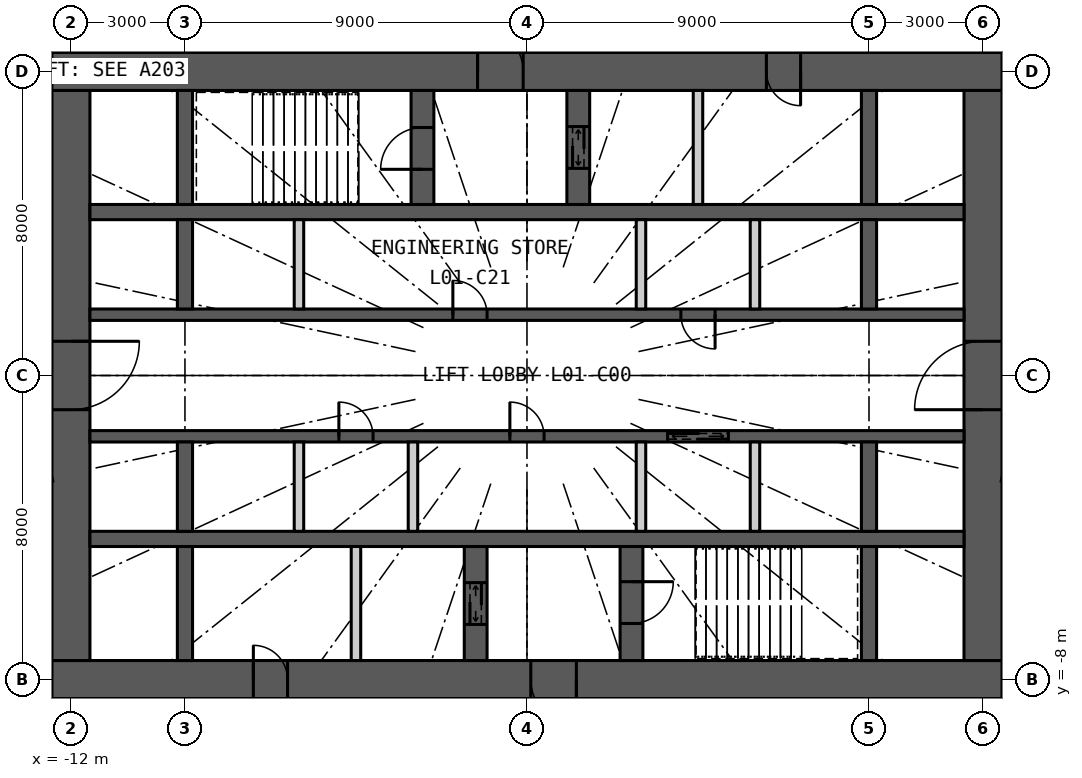
"""IFC4 building model, lengths in metres.
Left out: names, types, materials, properties, quantities, classifications, styles, units other than length and angle.
Written with IfcOpenShell. Run it as: python <this file> out.ifc"""

import sys

from ifc_helpers import new_model, si_unit, direction, frame, frame_2d, origin, place, context, subcontext, project, spatial, rectangle, extrude, element, fill, save


model = new_model("IFC4")
c1 = context("Model", 3, precision=1e-05, world=origin(), true_north=direction((0.0, 1.0)))
c2 = subcontext(c1, "Body", "Model", "MODEL_VIEW")
j1 = project(units=[si_unit("LENGTHUNIT", "METRE"), si_unit("PLANEANGLEUNIT", "RADIAN")], contexts=[c1])
p1 = place(None, origin())
s1 = spatial("IfcSite", under=j1, at=p1, CompositionType="ELEMENT")
p2 = place(p1, origin())
s2 = spatial("IfcBuilding", under=s1, at=p2, CompositionType="ELEMENT")
p3 = place(p2, frame((0.0, 0.0, 7.2)))
s3 = spatial("IfcBuildingStorey", under=s2, at=p3, CompositionType="ELEMENT", Elevation=7.2)
p4 = place(p3, frame((-12.5, 8.0, 0.0), z_axis=(0.0, 0.0, 1.0), x_axis=(1.0, 0.0, 0.0)))
e1 = element("IfcWall", 1, at=p4, inside=s3, PredefinedType="SHEAR", context=c2, shape_type="SweptSolid", body=[
    extrude(rectangle(XDim=25.0, YDim=1.0, at=frame_2d((12.5, 0.0))), origin(), (0.0, 0.0, 1.0), 6.6),
])
p5 = place(p4, frame((11.2, 0.0, 0.0)))
e2 = element("IfcOpeningElement", 2, at=p5, cuts=e1, PredefinedType="OPENING", context=c2, shape_type="SweptSolid", body=[
    extrude(rectangle(XDim=1.2, YDim=2.2, at=frame_2d((0.6, 1.1))), frame((0.0, 0.51, 0.0), z_axis=(0.0, -1.0, 0.0), x_axis=(1.0, 0.0, 0.0)), (0.0, 0.0, 1.0), 1.02),
])
p6 = place(p4, frame((18.8, 0.0, 0.0)))
e3 = element("IfcOpeningElement", 3, at=p6, cuts=e1, PredefinedType="OPENING", context=c2, shape_type="SweptSolid", body=[
    extrude(rectangle(XDim=0.9, YDim=2.2, at=frame_2d((0.45, 1.1))), frame((0.0, 0.51, 0.0), z_axis=(0.0, -1.0, 0.0), x_axis=(1.0, 0.0, 0.0)), (0.0, 0.0, 1.0), 1.02),
])
p7 = place(p3, frame((12.5, -8.0, 0.0), z_axis=(0.0, 0.0, 1.0), x_axis=(-1.0, 0.0, 0.0)))
e4 = element("IfcWall", 4, at=p7, inside=s3, PredefinedType="SHEAR", context=c2, shape_type="SweptSolid", body=[
    extrude(rectangle(XDim=25.0, YDim=1.0, at=frame_2d((12.5, 0.0))), origin(), (0.0, 0.0, 1.0), 6.6),
])
p8 = place(p7, frame((11.2, 0.0, 0.0)))
e5 = element("IfcOpeningElement", 5, at=p8, cuts=e4, PredefinedType="OPENING", context=c2, shape_type="SweptSolid", body=[
    extrude(rectangle(XDim=1.2, YDim=2.2, at=frame_2d((0.6, 1.1))), frame((0.0, 0.51, 0.0), z_axis=(0.0, -1.0, 0.0), x_axis=(1.0, 0.0, 0.0)), (0.0, 0.0, 1.0), 1.02),
])
p9 = place(p7, frame((18.8, 0.0, 0.0)))
e6 = element("IfcOpeningElement", 6, at=p9, cuts=e4, PredefinedType="OPENING", context=c2, shape_type="SweptSolid", body=[
    extrude(rectangle(XDim=0.9, YDim=2.2, at=frame_2d((0.45, 1.1))), frame((0.0, 0.51, 0.0), z_axis=(0.0, -1.0, 0.0), x_axis=(1.0, 0.0, 0.0)), (0.0, 0.0, 1.0), 1.02),
])
p10 = place(p3, frame((12.0, -7.5, 0.0), z_axis=(0.0, 0.0, 1.0), x_axis=(0.0, 1.0, 0.0)))
e7 = element("IfcWall", 7, at=p10, inside=s3, PredefinedType="SHEAR", context=c2, shape_type="SweptSolid", body=[
    extrude(rectangle(XDim=15.0, YDim=1.0, at=frame_2d((7.5, 0.0))), origin(), (0.0, 0.0, 1.0), 6.6),
])
p11 = place(p10, frame((6.6, 0.0, 0.0)))
e8 = element("IfcOpeningElement", 8, at=p11, cuts=e7, PredefinedType="OPENING", context=c2, shape_type="SweptSolid", body=[
    extrude(rectangle(XDim=1.8, YDim=2.2, at=frame_2d((0.9, 1.1))), frame((0.0, 0.51, 0.0), z_axis=(0.0, -1.0, 0.0), x_axis=(1.0, 0.0, 0.0)), (0.0, 0.0, 1.0), 1.02),
])
p12 = place(p3, frame((-12.0, 7.5, 0.0), z_axis=(0.0, 0.0, 1.0), x_axis=(0.0, -1.0, 0.0)))
e9 = element("IfcWall", 9, at=p12, inside=s3, PredefinedType="SHEAR", context=c2, shape_type="SweptSolid", body=[
    extrude(rectangle(XDim=15.0, YDim=1.0, at=frame_2d((7.5, 0.0))), origin(), (0.0, 0.0, 1.0), 6.6),
])
p13 = place(p12, frame((6.6, 0.0, 0.0)))
e10 = element("IfcOpeningElement", 10, at=p13, cuts=e9, PredefinedType="OPENING", context=c2, shape_type="SweptSolid", body=[
    extrude(rectangle(XDim=1.8, YDim=2.2, at=frame_2d((0.9, 1.1))), frame((0.0, 0.51, 0.0), z_axis=(0.0, -1.0, 0.0), x_axis=(1.0, 0.0, 0.0)), (0.0, 0.0, 1.0), 1.02),
])
p14 = place(p3, frame((-11.5, 4.3, 0.0), z_axis=(0.0, 0.0, 1.0), x_axis=(1.0, 0.0, 0.0)))
e11 = element("IfcWall", 11, at=p14, inside=s3, PredefinedType="SHEAR", context=c2, shape_type="SweptSolid", body=[
    extrude(rectangle(XDim=23.0, YDim=0.4, at=frame_2d((11.5, 0.0))), origin(), (0.0, 0.0, 1.0), 6.6),
])
p15 = place(p3, frame((-11.5, 1.6, 0.0), z_axis=(0.0, 0.0, 1.0), x_axis=(1.0, 0.0, 0.0)))
e12 = element("IfcWall", 12, at=p15, inside=s3, PredefinedType="SHEAR", context=c2, shape_type="SweptSolid", body=[
    extrude(rectangle(XDim=23.0, YDim=0.3, at=frame_2d((11.5, 0.0))), origin(), (0.0, 0.0, 1.0), 6.6),
])
p16 = place(p15, frame((9.55, 0.0, 0.0)))
e13 = element("IfcOpeningElement", 13, at=p16, cuts=e12, PredefinedType="OPENING", context=c2, shape_type="SweptSolid", body=[
    extrude(rectangle(XDim=0.9, YDim=2.2, at=frame_2d((0.45, 1.1))), frame((0.0, 0.16, 0.0), z_axis=(0.0, -1.0, 0.0), x_axis=(1.0, 0.0, 0.0)), (0.0, 0.0, 1.0), 0.32),
])
p17 = place(p15, frame((15.55, 0.0, 0.0)))
e14 = element("IfcOpeningElement", 14, at=p17, cuts=e12, PredefinedType="OPENING", context=c2, shape_type="SweptSolid", body=[
    extrude(rectangle(XDim=0.9, YDim=2.2, at=frame_2d((0.45, 1.1))), frame((0.0, 0.16, 0.0), z_axis=(0.0, -1.0, 0.0), x_axis=(1.0, 0.0, 0.0)), (0.0, 0.0, 1.0), 0.32),
])
p18 = place(p3, frame((-11.5, -4.3, 0.0), z_axis=(0.0, 0.0, 1.0), x_axis=(1.0, 0.0, 0.0)))
e15 = element("IfcWall", 15, at=p18, inside=s3, PredefinedType="SHEAR", context=c2, shape_type="SweptSolid", body=[
    extrude(rectangle(XDim=23.0, YDim=0.4, at=frame_2d((11.5, 0.0))), origin(), (0.0, 0.0, 1.0), 6.6),
])
p19 = place(p3, frame((-11.5, -1.6, 0.0), z_axis=(0.0, 0.0, 1.0), x_axis=(1.0, 0.0, 0.0)))
e16 = element("IfcWall", 16, at=p19, inside=s3, PredefinedType="SHEAR", context=c2, shape_type="SweptSolid", body=[
    extrude(rectangle(XDim=23.0, YDim=0.3, at=frame_2d((11.5, 0.0))), origin(), (0.0, 0.0, 1.0), 6.6),
])
p20 = place(p19, frame((15.2, 0.0, 0.0)))
e17 = element("IfcOpeningElement", 17, at=p20, cuts=e16, PredefinedType="OPENING", context=c2, shape_type="SweptSolid", body=[
    extrude(rectangle(XDim=1.6, YDim=2.4, at=frame_2d((0.8, 1.2))), frame((0.0, 0.16, 0.0), z_axis=(0.0, -1.0, 0.0), x_axis=(1.0, 0.0, 0.0)), (0.0, 0.0, 1.0), 0.32),
])
p21 = place(p19, frame((6.55, 0.0, 0.0)))
e18 = element("IfcOpeningElement", 18, at=p21, cuts=e16, PredefinedType="OPENING", context=c2, shape_type="SweptSolid", body=[
    extrude(rectangle(XDim=0.9, YDim=2.2, at=frame_2d((0.45, 1.1))), frame((0.0, 0.16, 0.0), z_axis=(0.0, -1.0, 0.0), x_axis=(1.0, 0.0, 0.0)), (0.0, 0.0, 1.0), 0.32),
])
p22 = place(p19, frame((11.05, 0.0, 0.0)))
e19 = element("IfcOpeningElement", 19, at=p22, cuts=e16, PredefinedType="OPENING", context=c2, shape_type="SweptSolid", body=[
    extrude(rectangle(XDim=0.9, YDim=2.2, at=frame_2d((0.45, 1.1))), frame((0.0, 0.16, 0.0), z_axis=(0.0, -1.0, 0.0), x_axis=(1.0, 0.0, 0.0)), (0.0, 0.0, 1.0), 0.32),
])
p23 = place(p3, frame((-9.0, 4.5, 0.0), z_axis=(0.0, 0.0, 1.0), x_axis=(0.0, 1.0, 0.0)))
e20 = element("IfcWall", 20, at=p23, inside=s3, PredefinedType="SHEAR", context=c2, shape_type="SweptSolid", body=[
    extrude(rectangle(XDim=3.0, YDim=0.4, at=frame_2d((1.5, 0.0))), origin(), (0.0, 0.0, 1.0), 6.6),
])
for number, where, z_axis, x_axis in (
    (21, (-9.0, 1.75, 0.0), (0.0, 0.0, 1.0), (0.0, 1.0, 0.0)),
    (22, (-9.0, -4.1, 0.0), (0.0, 0.0, 1.0), (0.0, 1.0, 0.0)),
):
    element("IfcWall", number, at=place(p3, frame(where, z_axis=z_axis, x_axis=x_axis)), inside=s3, PredefinedType="SHEAR", context=c2, shape_type="SweptSolid", body=[
        extrude(rectangle(XDim=2.35, YDim=0.4, at=frame_2d((1.175, 0.0))), origin(), (0.0, 0.0, 1.0), 6.6),
    ])
for number, where, z_axis, x_axis in (
    (23, (-9.0, -7.5, 0.0), (0.0, 0.0, 1.0), (0.0, 1.0, 0.0)),
    (24, (9.0, 4.5, 0.0), (0.0, 0.0, 1.0), (0.0, 1.0, 0.0)),
):
    element("IfcWall", number, at=place(p3, frame(where, z_axis=z_axis, x_axis=x_axis)), inside=s3, PredefinedType="SHEAR", context=c2, shape_type="SweptSolid", body=[
        extrude(rectangle(XDim=3.0, YDim=0.4, at=frame_2d((1.5, 0.0))), origin(), (0.0, 0.0, 1.0), 6.6),
    ])
for number, where, z_axis, x_axis in (
    (25, (9.0, 1.75, 0.0), (0.0, 0.0, 1.0), (0.0, 1.0, 0.0)),
    (26, (9.0, -4.1, 0.0), (0.0, 0.0, 1.0), (0.0, 1.0, 0.0)),
):
    element("IfcWall", number, at=place(p3, frame(where, z_axis=z_axis, x_axis=x_axis)), inside=s3, PredefinedType="SHEAR", context=c2, shape_type="SweptSolid", body=[
        extrude(rectangle(XDim=2.35, YDim=0.4, at=frame_2d((1.175, 0.0))), origin(), (0.0, 0.0, 1.0), 6.6),
    ])
p24 = place(p3, frame((9.0, -7.5, 0.0), z_axis=(0.0, 0.0, 1.0), x_axis=(0.0, 1.0, 0.0)))
e27 = element("IfcWall", 27, at=p24, inside=s3, PredefinedType="SHEAR", context=c2, shape_type="SweptSolid", body=[
    extrude(rectangle(XDim=3.0, YDim=0.4, at=frame_2d((1.5, 0.0))), origin(), (0.0, 0.0, 1.0), 6.6),
])
p25 = place(p3, frame((-2.75, 4.5, 0.0), z_axis=(0.0, 0.0, 1.0), x_axis=(0.0, 1.0, 0.0)))
e28 = element("IfcWall", 28, at=p25, inside=s3, PredefinedType="SHEAR", context=c2, shape_type="SweptSolid", body=[
    extrude(rectangle(XDim=3.0, YDim=0.6, at=frame_2d((1.5, 0.0))), origin(), (0.0, 0.0, 1.0), 6.6),
])
p26 = place(p25, frame((0.925, 0.0, 0.0)))
e29 = element("IfcOpeningElement", 29, at=p26, cuts=e28, PredefinedType="OPENING", context=c2, shape_type="SweptSolid", body=[
    extrude(rectangle(XDim=1.1, YDim=2.2, at=frame_2d((0.55, 1.1))), frame((0.0, 0.31, 0.0), z_axis=(0.0, -1.0, 0.0), x_axis=(1.0, 0.0, 0.0)), (0.0, 0.0, 1.0), 0.62),
])
p27 = place(p3, frame((1.35, 4.5, 0.0), z_axis=(0.0, 0.0, 1.0), x_axis=(0.0, 1.0, 0.0)))
e30 = element("IfcWall", 30, at=p27, inside=s3, PredefinedType="SHEAR", context=c2, shape_type="SweptSolid", body=[
    extrude(rectangle(XDim=3.0, YDim=0.6, at=frame_2d((1.5, 0.0))), origin(), (0.0, 0.0, 1.0), 6.6),
])
p28 = place(p27, frame((0.95, 0.0, 0.0)))
e31 = element("IfcOpeningElement", 31, at=p28, cuts=e30, PredefinedType="OPENING", context=c2, shape_type="SweptSolid", body=[
    extrude(rectangle(XDim=1.1, YDim=2.2, at=frame_2d((0.55, 1.1))), frame((0.0, 0.31, 0.0), z_axis=(0.0, -1.0, 0.0), x_axis=(1.0, 0.0, 0.0)), (0.0, 0.0, 1.0), 0.62),
])
p29 = place(p3, frame((4.5, 4.5, 0.0), z_axis=(0.0, 0.0, 1.0), x_axis=(0.0, 1.0, 0.0)))
e32 = element("IfcWall", 32, at=p29, inside=s3, PredefinedType="PARTITIONING", context=c2, shape_type="SweptSolid", body=[
    extrude(rectangle(XDim=3.0, YDim=0.25, at=frame_2d((1.5, 0.0))), origin(), (0.0, 0.0, 1.0), 6.6),
])
p30 = place(p3, frame((2.75, -7.5, 0.0), z_axis=(0.0, 0.0, 1.0), x_axis=(0.0, 1.0, 0.0)))
e33 = element("IfcWall", 33, at=p30, inside=s3, PredefinedType="SHEAR", context=c2, shape_type="SweptSolid", body=[
    extrude(rectangle(XDim=3.0, YDim=0.6, at=frame_2d((1.5, 0.0))), origin(), (0.0, 0.0, 1.0), 6.6),
])
p31 = place(p30, frame((0.975, 0.0, 0.0)))
e34 = element("IfcOpeningElement", 34, at=p31, cuts=e33, PredefinedType="OPENING", context=c2, shape_type="SweptSolid", body=[
    extrude(rectangle(XDim=1.1, YDim=2.2, at=frame_2d((0.55, 1.1))), frame((0.0, 0.31, 0.0), z_axis=(0.0, -1.0, 0.0), x_axis=(1.0, 0.0, 0.0)), (0.0, 0.0, 1.0), 0.62),
])
p32 = place(p3, frame((-1.35, -7.5, 0.0), z_axis=(0.0, 0.0, 1.0), x_axis=(0.0, 1.0, 0.0)))
e35 = element("IfcWall", 35, at=p32, inside=s3, PredefinedType="SHEAR", context=c2, shape_type="SweptSolid", body=[
    extrude(rectangle(XDim=3.0, YDim=0.6, at=frame_2d((1.5, 0.0))), origin(), (0.0, 0.0, 1.0), 6.6),
])
p33 = place(p32, frame((0.95, 0.0, 0.0)))
e36 = element("IfcOpeningElement", 36, at=p33, cuts=e35, PredefinedType="OPENING", context=c2, shape_type="SweptSolid", body=[
    extrude(rectangle(XDim=1.1, YDim=2.2, at=frame_2d((0.55, 1.1))), frame((0.0, 0.31, 0.0), z_axis=(0.0, -1.0, 0.0), x_axis=(1.0, 0.0, 0.0)), (0.0, 0.0, 1.0), 0.62),
])
p34 = place(p3, frame((-4.5, -7.5, 0.0), z_axis=(0.0, 0.0, 1.0), x_axis=(0.0, 1.0, 0.0)))
e37 = element("IfcWall", 37, at=p34, inside=s3, PredefinedType="PARTITIONING", context=c2, shape_type="SweptSolid", body=[
    extrude(rectangle(XDim=3.0, YDim=0.25, at=frame_2d((1.5, 0.0))), origin(), (0.0, 0.0, 1.0), 6.6),
])
for number, where, z_axis, x_axis in (
    (38, (-6.0, 1.75, 0.0), (0.0, 0.0, 1.0), (0.0, 1.0, 0.0)),
    (39, (3.0, 1.75, 0.0), (0.0, 0.0, 1.0), (0.0, 1.0, 0.0)),
    (40, (6.0, 1.75, 0.0), (0.0, 0.0, 1.0), (0.0, 1.0, 0.0)),
    (41, (-6.0, -4.1, 0.0), (0.0, 0.0, 1.0), (0.0, 1.0, 0.0)),
    (42, (-3.0, -4.1, 0.0), (0.0, 0.0, 1.0), (0.0, 1.0, 0.0)),
    (43, (3.0, -4.1, 0.0), (0.0, 0.0, 1.0), (0.0, 1.0, 0.0)),
    (44, (6.0, -4.1, 0.0), (0.0, 0.0, 1.0), (0.0, 1.0, 0.0)),
):
    element("IfcWall", number, at=place(p3, frame(where, z_axis=z_axis, x_axis=x_axis)), inside=s3, PredefinedType="PARTITIONING", context=c2, shape_type="SweptSolid", body=[
        extrude(rectangle(XDim=2.35, YDim=0.25, at=frame_2d((1.175, 0.0))), origin(), (0.0, 0.0, 1.0), 6.6),
    ])
p35 = place(p3, frame((-18.9, -4.052, 0.0), z_axis=(0.0, 0.0, 1.0), x_axis=(0.977781666858, 0.2096258857, 0.0)))
e45 = element("IfcWall", 45, at=p35, inside=s3, PredefinedType="PARTITIONING", context=c2, shape_type="SweptSolid", body=[
    extrude(rectangle(XDim=6.545, YDim=0.2, at=frame_2d((3.273, 0.0))), origin(), (0.0, 0.0, 1.0), 6.35),
])
p36 = place(p35, frame((2.373, 0.0, 0.0)))
e46 = element("IfcOpeningElement", 46, at=p36, cuts=e45, PredefinedType="OPENING", context=c2, shape_type="SweptSolid", body=[
    extrude(rectangle(XDim=1.8, YDim=2.4, at=frame_2d((0.9, 1.2))), frame((0.0, 0.11, 0.0), z_axis=(0.0, -1.0, 0.0), x_axis=(1.0, 0.0, 0.0)), (0.0, 0.0, 1.0), 0.22),
])
p37 = place(p3, frame((18.9, -4.052, 0.0), z_axis=(0.0, 0.0, 1.0), x_axis=(-0.977781666858, 0.2096258857, 0.0)))
e47 = element("IfcWall", 47, at=p37, inside=s3, PredefinedType="PARTITIONING", context=c2, shape_type="SweptSolid", body=[
    extrude(rectangle(XDim=6.545, YDim=0.2, at=frame_2d((3.273, 0.0))), origin(), (0.0, 0.0, 1.0), 6.35),
])
p38 = place(p37, frame((2.373, 0.0, 0.0)))
e48 = element("IfcOpeningElement", 48, at=p38, cuts=e47, PredefinedType="OPENING", context=c2, shape_type="SweptSolid", body=[
    extrude(rectangle(XDim=1.8, YDim=2.4, at=frame_2d((0.9, 1.2))), frame((0.0, 0.11, 0.0), z_axis=(0.0, -1.0, 0.0), x_axis=(1.0, 0.0, 0.0)), (0.0, 0.0, 1.0), 0.22),
])
p39 = place(p5, origin())
e49 = element("IfcDoor", 49, at=p39, inside=s3, OperationType="SINGLE_SWING_LEFT", PredefinedType="DOOR", context=c2, shape_type="SweptSolid", body=[
    extrude(rectangle(XDim=1.2, YDim=2.2, at=frame_2d((0.6, 1.1))), frame((0.0, 0.025, 0.0), z_axis=(0.0, -1.0, 0.0), x_axis=(1.0, 0.0, 0.0)), (0.0, 0.0, 1.0), 0.05),
])
fill(e2, e49)
p40 = place(p26, origin())
e50 = element("IfcDoor", 50, at=p40, inside=s3, OperationType="SINGLE_SWING_LEFT", PredefinedType="DOOR", context=c2, shape_type="SweptSolid", body=[
    extrude(rectangle(XDim=1.1, YDim=2.2, at=frame_2d((0.55, 1.1))), frame((0.0, 0.025, 0.0), z_axis=(0.0, -1.0, 0.0), x_axis=(1.0, 0.0, 0.0)), (0.0, 0.0, 1.0), 0.05),
])
fill(e29, e50)
p41 = place(p28, origin())
e51 = element("IfcDoor", 51, at=p41, inside=s3, OperationType="DOUBLE_DOOR_SLIDING", PredefinedType="DOOR", context=c2, shape_type="SweptSolid", body=[
    extrude(rectangle(XDim=1.1, YDim=2.2, at=frame_2d((0.55, 1.1))), frame((0.0, 0.025, 0.0), z_axis=(0.0, -1.0, 0.0), x_axis=(1.0, 0.0, 0.0)), (0.0, 0.0, 1.0), 0.05),
])
fill(e31, e51)
p42 = place(p6, origin())
e52 = element("IfcDoor", 52, at=p42, inside=s3, OperationType="SINGLE_SWING_RIGHT", PredefinedType="DOOR", context=c2, shape_type="SweptSolid", body=[
    extrude(rectangle(XDim=0.9, YDim=2.2, at=frame_2d((0.45, 1.1))), frame((0.0, 0.025, 0.0), z_axis=(0.0, -1.0, 0.0), x_axis=(1.0, 0.0, 0.0)), (0.0, 0.0, 1.0), 0.05),
])
fill(e3, e52)
p43 = place(p8, origin())
e53 = element("IfcDoor", 53, at=p43, inside=s3, OperationType="SINGLE_SWING_LEFT", PredefinedType="DOOR", context=c2, shape_type="SweptSolid", body=[
    extrude(rectangle(XDim=1.2, YDim=2.2, at=frame_2d((0.6, 1.1))), frame((0.0, 0.025, 0.0), z_axis=(0.0, -1.0, 0.0), x_axis=(1.0, 0.0, 0.0)), (0.0, 0.0, 1.0), 0.05),
])
fill(e5, e53)
p44 = place(p31, origin())
e54 = element("IfcDoor", 54, at=p44, inside=s3, OperationType="SINGLE_SWING_RIGHT", PredefinedType="DOOR", context=c2, shape_type="SweptSolid", body=[
    extrude(rectangle(XDim=1.1, YDim=2.2, at=frame_2d((0.55, 1.1))), frame((0.0, 0.025, 0.0), z_axis=(0.0, -1.0, 0.0), x_axis=(1.0, 0.0, 0.0)), (0.0, 0.0, 1.0), 0.05),
])
fill(e34, e54)
p45 = place(p33, origin())
e55 = element("IfcDoor", 55, at=p45, inside=s3, OperationType="DOUBLE_DOOR_SLIDING", PredefinedType="DOOR", context=c2, shape_type="SweptSolid", body=[
    extrude(rectangle(XDim=1.1, YDim=2.2, at=frame_2d((0.55, 1.1))), frame((0.0, 0.025, 0.0), z_axis=(0.0, -1.0, 0.0), x_axis=(1.0, 0.0, 0.0)), (0.0, 0.0, 1.0), 0.05),
])
fill(e36, e55)
p46 = place(p9, origin())
e56 = element("IfcDoor", 56, at=p46, inside=s3, OperationType="SINGLE_SWING_RIGHT", PredefinedType="DOOR", context=c2, shape_type="SweptSolid", body=[
    extrude(rectangle(XDim=0.9, YDim=2.2, at=frame_2d((0.45, 1.1))), frame((0.0, 0.025, 0.0), z_axis=(0.0, -1.0, 0.0), x_axis=(1.0, 0.0, 0.0)), (0.0, 0.0, 1.0), 0.05),
])
fill(e6, e56)
p47 = place(p20, origin())
e57 = element("IfcDoor", 57, at=p47, inside=s3, OperationType="DOUBLE_DOOR_SLIDING", PredefinedType="DOOR", context=c2, shape_type="SweptSolid", body=[
    extrude(rectangle(XDim=1.6, YDim=2.4, at=frame_2d((0.8, 1.2))), frame((0.0, 0.025, 0.0), z_axis=(0.0, -1.0, 0.0), x_axis=(1.0, 0.0, 0.0)), (0.0, 0.0, 1.0), 0.05),
])
fill(e17, e57)
p48 = place(p16, origin())
e58 = element("IfcDoor", 58, at=p48, inside=s3, OperationType="SINGLE_SWING_LEFT", PredefinedType="DOOR", context=c2, shape_type="SweptSolid", body=[
    extrude(rectangle(XDim=0.9, YDim=2.2, at=frame_2d((0.45, 1.1))), frame((0.0, 0.025, 0.0), z_axis=(0.0, -1.0, 0.0), x_axis=(1.0, 0.0, 0.0)), (0.0, 0.0, 1.0), 0.05),
])
fill(e13, e58)
p49 = place(p17, origin())
e59 = element("IfcDoor", 59, at=p49, inside=s3, OperationType="SINGLE_SWING_RIGHT", PredefinedType="DOOR", context=c2, shape_type="SweptSolid", body=[
    extrude(rectangle(XDim=0.9, YDim=2.2, at=frame_2d((0.45, 1.1))), frame((0.0, 0.025, 0.0), z_axis=(0.0, -1.0, 0.0), x_axis=(1.0, 0.0, 0.0)), (0.0, 0.0, 1.0), 0.05),
])
fill(e14, e59)
p50 = place(p21, origin())
e60 = element("IfcDoor", 60, at=p50, inside=s3, OperationType="SINGLE_SWING_LEFT", PredefinedType="DOOR", context=c2, shape_type="SweptSolid", body=[
    extrude(rectangle(XDim=0.9, YDim=2.2, at=frame_2d((0.45, 1.1))), frame((0.0, 0.025, 0.0), z_axis=(0.0, -1.0, 0.0), x_axis=(1.0, 0.0, 0.0)), (0.0, 0.0, 1.0), 0.05),
])
fill(e18, e60)
p51 = place(p22, origin())
e61 = element("IfcDoor", 61, at=p51, inside=s3, OperationType="SINGLE_SWING_LEFT", PredefinedType="DOOR", context=c2, shape_type="SweptSolid", body=[
    extrude(rectangle(XDim=0.9, YDim=2.2, at=frame_2d((0.45, 1.1))), frame((0.0, 0.025, 0.0), z_axis=(0.0, -1.0, 0.0), x_axis=(1.0, 0.0, 0.0)), (0.0, 0.0, 1.0), 0.05),
])
fill(e19, e61)
p52 = place(p11, origin())
e62 = element("IfcDoor", 62, at=p52, inside=s3, OperationType="DOUBLE_DOOR_DOUBLE_SWING", PredefinedType="DOOR", context=c2, shape_type="SweptSolid", body=[
    extrude(rectangle(XDim=1.8, YDim=2.2, at=frame_2d((0.9, 1.1))), frame((0.0, 0.025, 0.0), z_axis=(0.0, -1.0, 0.0), x_axis=(1.0, 0.0, 0.0)), (0.0, 0.0, 1.0), 0.05),
])
fill(e8, e62)
p53 = place(p13, origin())
e63 = element("IfcDoor", 63, at=p53, inside=s3, OperationType="DOUBLE_DOOR_DOUBLE_SWING", PredefinedType="DOOR", context=c2, shape_type="SweptSolid", body=[
    extrude(rectangle(XDim=1.8, YDim=2.2, at=frame_2d((0.9, 1.1))), frame((0.0, 0.025, 0.0), z_axis=(0.0, -1.0, 0.0), x_axis=(1.0, 0.0, 0.0)), (0.0, 0.0, 1.0), 0.05),
])
fill(e10, e63)
save(model, sys.argv[1])
